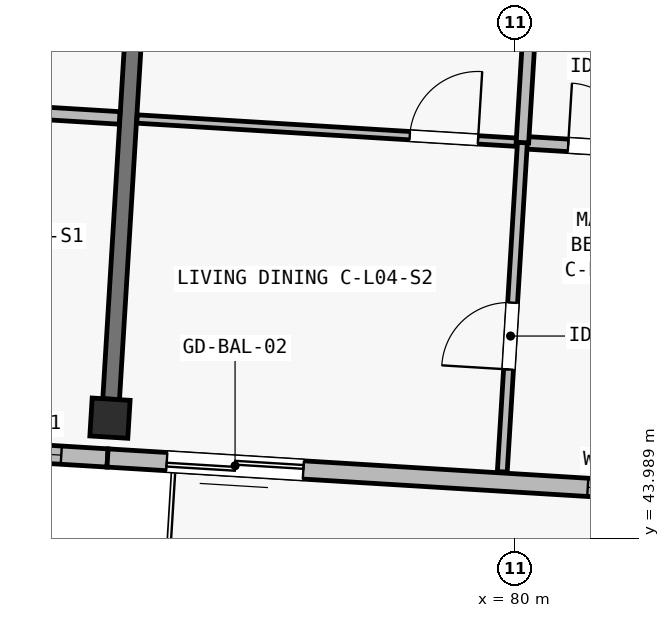
"""IFC4 building model, lengths in metres.
Left out: names, types, materials, properties, quantities, classifications, styles, units other than length and angle.
Written with IfcOpenShell. Run it as: python <this file> out.ifc"""

import sys

from ifc_helpers import new_model, si_unit, direction, frame, frame_2d, origin, origin_2d, place, context, subcontext, project, spatial, rectangle, extrude, element, fill, save


model = new_model("IFC4")
c1 = context("Model", 3, precision=1e-05, world=origin(), true_north=direction((0.0, 1.0)))
c2 = subcontext(c1, "Body", "Model", "MODEL_VIEW")
j1 = project(units=[si_unit("LENGTHUNIT", "METRE"), si_unit("PLANEANGLEUNIT", "RADIAN")], contexts=[c1])
p1 = place(None, origin())
s1 = spatial("IfcSite", under=j1, at=p1, CompositionType="ELEMENT")
p2 = place(p1, origin())
s2 = spatial("IfcBuilding", under=s1, at=p2, CompositionType="ELEMENT")
p3 = place(p2, frame((0.0, 0.0, 14.9)))
s3 = spatial("IfcBuildingStorey", under=s2, at=p3, CompositionType="ELEMENT", Elevation=14.9)
p4 = place(p3, frame((74.672, 45.572, 0.0), z_axis=(0.0, 0.0, 1.0), x_axis=(0.998134798422, -0.061048539535, 0.0)))
e1 = element("IfcColumn", 1, at=p4, inside=s3, PredefinedType="COLUMN", context=c2, shape_type="SweptSolid", body=[
    extrude(rectangle(XDim=0.5, YDim=0.5, at=origin_2d()), origin(), (0.0, 0.0, 1.0), 3.25),
])
p5 = place(p3, frame((74.687, 45.822, 0.0), z_axis=(0.0, 0.0, 1.0), x_axis=(0.061033859059, 0.99813569621, 0.0)))
e2 = element("IfcWall", 2, at=p5, inside=s3, PredefinedType="SHEAR", context=c2, shape_type="SweptSolid", body=[
    extrude(rectangle(XDim=7.1, YDim=0.22, at=frame_2d((3.55, 0.0))), origin(), (0.0, 0.0, 1.0), 2.5),
])
p6 = place(p3, frame((74.64, 45.048, 0.0), z_axis=(0.0, 0.0, 1.0), x_axis=(-0.998135669243, 0.061034300063, 0.0)))
e3 = element("IfcWall", 3, at=p6, inside=s3, PredefinedType="SOLIDWALL", context=c2, shape_type="SweptSolid", body=[
    extrude(rectangle(XDim=7.6, YDim=0.24, at=frame_2d((3.8, 0.0))), origin(), (0.0, 0.0, 1.0), 3.0),
])
p7 = place(p6, frame((0.61, 0.0, 0.52)))
e4 = element("IfcOpeningElement", 4, at=p7, cuts=e3, PredefinedType="OPENING", context=c2, shape_type="SweptSolid", body=[
    extrude(rectangle(XDim=0.78, YDim=2.2, at=frame_2d((0.39, 1.1))), frame((0.0, 0.135, 0.0), z_axis=(0.0, -1.0, 0.0), x_axis=(1.0, 0.0, 0.0)), (0.0, 0.0, 1.0), 0.27),
])
p8 = place(p6, frame((1.952, 0.0, 0.42)))
e5 = element("IfcOpeningElement", 5, at=p8, cuts=e3, PredefinedType="OPENING", context=c2, shape_type="SweptSolid", body=[
    extrude(rectangle(XDim=0.8, YDim=2.3, at=frame_2d((0.4, 1.15))), frame((0.0, 0.135, 0.0), z_axis=(0.0, -1.0, 0.0), x_axis=(1.0, 0.0, 0.0)), (0.0, 0.0, 1.0), 0.27),
])
p9 = place(p6, frame((5.755, 0.0, 0.52)))
e6 = element("IfcOpeningElement", 6, at=p9, cuts=e3, PredefinedType="OPENING", context=c2, shape_type="SweptSolid", body=[
    extrude(rectangle(XDim=0.84, YDim=2.28, at=frame_2d((0.42, 1.14))), frame((0.0, 0.135, 0.0), z_axis=(0.0, -1.0, 0.0), x_axis=(1.0, 0.0, 0.0)), (0.0, 0.0, 1.0), 0.27),
])
p10 = place(p3, frame((82.225, 44.584, 0.0), z_axis=(0.0, 0.0, 1.0), x_axis=(-0.998133591969, 0.061068261669, 0.0)))
e7 = element("IfcWall", 7, at=p10, inside=s3, PredefinedType="SOLIDWALL", context=c2, shape_type="SweptSolid", body=[
    extrude(rectangle(XDim=7.6, YDim=0.24, at=frame_2d((3.8, 0.0))), origin(), (0.0, 0.0, 1.0), 3.0),
])
p11 = place(p10, frame((5.019, 0.0, 0.0)))
e8 = element("IfcOpeningElement", 8, at=p11, cuts=e7, PredefinedType="OPENING", context=c2, shape_type="SweptSolid", body=[
    extrude(rectangle(XDim=1.8, YDim=2.12, at=frame_2d((0.9, 1.06))), frame((0.0, 0.135, 0.0), z_axis=(0.0, -1.0, 0.0), x_axis=(1.0, 0.0, 0.0)), (0.0, 0.0, 1.0), 0.27),
])
p12 = place(p10, frame((0.63, 0.0, 0.42)))
e9 = element("IfcOpeningElement", 9, at=p12, cuts=e7, PredefinedType="OPENING", context=c2, shape_type="SweptSolid", body=[
    extrude(rectangle(XDim=0.64, YDim=2.18, at=frame_2d((0.32, 1.09))), frame((0.0, 0.135, 0.0), z_axis=(0.0, -1.0, 0.0), x_axis=(1.0, 0.0, 0.0)), (0.0, 0.0, 1.0), 0.27),
])
p13 = place(p3, frame((71.12, 49.747, 0.0), z_axis=(0.0, 0.0, 1.0), x_axis=(0.998136719672, -0.061017119263, 0.0)))
e10 = element("IfcWall", 10, at=p13, inside=s3, PredefinedType="PLUMBINGWALL", context=c2, shape_type="SweptSolid", body=[
    extrude(rectangle(XDim=3.685, YDim=0.165, at=frame_2d((1.843, 0.0))), origin(), (0.0, 0.0, 1.0), 2.97),
])
p14 = place(p13, frame((1.3, 0.0, 0.0)))
e11 = element("IfcOpeningElement", 11, at=p14, cuts=e10, PredefinedType="OPENING", context=c2, shape_type="SweptSolid", body=[
    extrude(rectangle(XDim=0.82, YDim=2.08, at=frame_2d((0.41, 1.04))), frame((0.0, 0.097, 0.0), z_axis=(0.0, -1.0, 0.0), x_axis=(1.0, 0.0, 0.0)), (0.0, 0.0, 1.0), 0.195),
])
p15 = place(p3, frame((75.028, 49.508, 0.0), z_axis=(0.0, 0.0, 1.0), x_axis=(0.998135637207, -0.061034823981, 0.0)))
e12 = element("IfcWall", 12, at=p15, inside=s3, PredefinedType="PARTITIONING", context=c2, shape_type="SweptSolid", body=[
    extrude(rectangle(XDim=5.08, YDim=0.11, at=frame_2d((2.54, 0.0))), origin(), (0.0, 0.0, 1.0), 2.97),
])
p16 = place(p15, frame((3.595, 0.0, 0.0)))
e13 = element("IfcOpeningElement", 13, at=p16, cuts=e12, PredefinedType="OPENING", context=c2, shape_type="SweptSolid", body=[
    extrude(rectangle(XDim=0.9, YDim=2.1, at=frame_2d((0.45, 1.05))), frame((0.0, 0.07, 0.0), z_axis=(0.0, -1.0, 0.0), x_axis=(1.0, 0.0, 0.0)), (0.0, 0.0, 1.0), 0.14),
])
p17 = place(p3, frame((80.098, 49.198, 0.0), z_axis=(0.0, 0.0, 1.0), x_axis=(0.998138723231, -0.060984335579, 0.0)))
e14 = element("IfcWall", 14, at=p17, inside=s3, PredefinedType="PLUMBINGWALL", context=c2, shape_type="SweptSolid", body=[
    extrude(rectangle(XDim=2.29, YDim=0.165, at=frame_2d((1.145, 0.0))), origin(), (0.0, 0.0, 1.0), 2.97),
])
p18 = place(p17, frame((0.603, 0.0, 0.0)))
e15 = element("IfcOpeningElement", 15, at=p18, cuts=e14, PredefinedType="OPENING", context=c2, shape_type="SweptSolid", body=[
    extrude(rectangle(XDim=0.82, YDim=2.08, at=frame_2d((0.41, 1.04))), frame((0.0, 0.097, 0.0), z_axis=(0.0, -1.0, 0.0), x_axis=(1.0, 0.0, 0.0)), (0.0, 0.0, 1.0), 0.195),
])
p19 = place(p3, frame((79.833, 44.866, 0.0), z_axis=(0.0, 0.0, 1.0), x_axis=(0.061036861365, 0.998135512621, 0.0)))
e16 = element("IfcWall", 16, at=p19, inside=s3, PredefinedType="PARTITIONING", context=c2, shape_type="SweptSolid", body=[
    extrude(rectangle(XDim=4.34, YDim=0.13, at=frame_2d((2.17, 0.0))), origin(), (0.0, 0.0, 1.0), 2.97),
])
p20 = place(p19, frame((1.35, 0.0, 0.0)))
e17 = element("IfcOpeningElement", 17, at=p20, cuts=e16, PredefinedType="OPENING", context=c2, shape_type="SweptSolid", body=[
    extrude(rectangle(XDim=0.88, YDim=2.1, at=frame_2d((0.44, 1.05))), frame((0.0, 0.08, 0.0), z_axis=(0.0, -1.0, 0.0), x_axis=(1.0, 0.0, 0.0)), (0.0, 0.0, 1.0), 0.16),
])
p21 = place(p3, frame((80.098, 49.198, 0.0), z_axis=(0.0, 0.0, 1.0), x_axis=(0.061063718724, 0.998133869907, 0.0)))
e18 = element("IfcWall", 18, at=p21, inside=s3, PredefinedType="PLUMBINGWALL", context=c2, shape_type="SweptSolid", body=[
    extrude(rectangle(XDim=4.07, YDim=0.165, at=frame_2d((2.035, 0.0))), origin(), (0.0, 0.0, 1.0), 2.97),
])
p22 = place(p7, origin())
e19 = element("IfcWindow", 19, at=p22, inside=s3, PartitioningType="SINGLE_PANEL", PredefinedType="WINDOW", context=c2, shape_type="SweptSolid", body=[
    extrude(rectangle(XDim=0.78, YDim=2.2, at=frame_2d((0.39, 1.1))), frame((0.0, 0.03, 0.0), z_axis=(0.0, -1.0, 0.0), x_axis=(1.0, 0.0, 0.0)), (0.0, 0.0, 1.0), 0.06),
])
fill(e4, e19)
p23 = place(p11, origin())
e20 = element("IfcDoor", 20, at=p23, inside=s3, OperationType="SLIDING_TO_LEFT", PredefinedType="DOOR", context=c2, shape_type="SweptSolid", body=[
    extrude(rectangle(XDim=1.8, YDim=2.12, at=frame_2d((0.9, 1.06))), frame((0.0, 0.025, 0.0), z_axis=(0.0, -1.0, 0.0), x_axis=(1.0, 0.0, 0.0)), (0.0, 0.0, 1.0), 0.05),
])
fill(e8, e20)
p24 = place(p12, origin())
e21 = element("IfcWindow", 21, at=p24, inside=s3, PartitioningType="SINGLE_PANEL", PredefinedType="WINDOW", context=c2, shape_type="SweptSolid", body=[
    extrude(rectangle(XDim=0.64, YDim=2.18, at=frame_2d((0.32, 1.09))), frame((0.0, 0.03, 0.0), z_axis=(0.0, -1.0, 0.0), x_axis=(1.0, 0.0, 0.0)), (0.0, 0.0, 1.0), 0.06),
])
fill(e9, e21)
p25 = place(p16, origin())
e22 = element("IfcDoor", 22, at=p25, inside=s3, OperationType="SINGLE_SWING_RIGHT", PredefinedType="DOOR", context=c2, shape_type="SweptSolid", body=[
    extrude(rectangle(XDim=0.9, YDim=2.1, at=frame_2d((0.45, 1.05))), frame((0.0, 0.025, 0.0), z_axis=(0.0, -1.0, 0.0), x_axis=(1.0, 0.0, 0.0)), (0.0, 0.0, 1.0), 0.05),
])
fill(e13, e22)
p26 = place(p18, origin())
e23 = element("IfcDoor", 23, at=p26, inside=s3, OperationType="SINGLE_SWING_LEFT", PredefinedType="DOOR", context=c2, shape_type="SweptSolid", body=[
    extrude(rectangle(XDim=0.82, YDim=2.08, at=frame_2d((0.41, 1.04))), frame((0.0, 0.025, 0.0), z_axis=(0.0, -1.0, 0.0), x_axis=(1.0, 0.0, 0.0)), (0.0, 0.0, 1.0), 0.05),
])
fill(e15, e23)
p27 = place(p20, origin())
e24 = element("IfcDoor", 24, at=p27, inside=s3, OperationType="SINGLE_SWING_LEFT", PredefinedType="DOOR", context=c2, shape_type="SweptSolid", body=[
    extrude(rectangle(XDim=0.88, YDim=2.1, at=frame_2d((0.44, 1.05))), frame((0.0, 0.025, 0.0), z_axis=(0.0, -1.0, 0.0), x_axis=(1.0, 0.0, 0.0)), (0.0, 0.0, 1.0), 0.05),
])
fill(e17, e24)
save(model, sys.argv[1])
